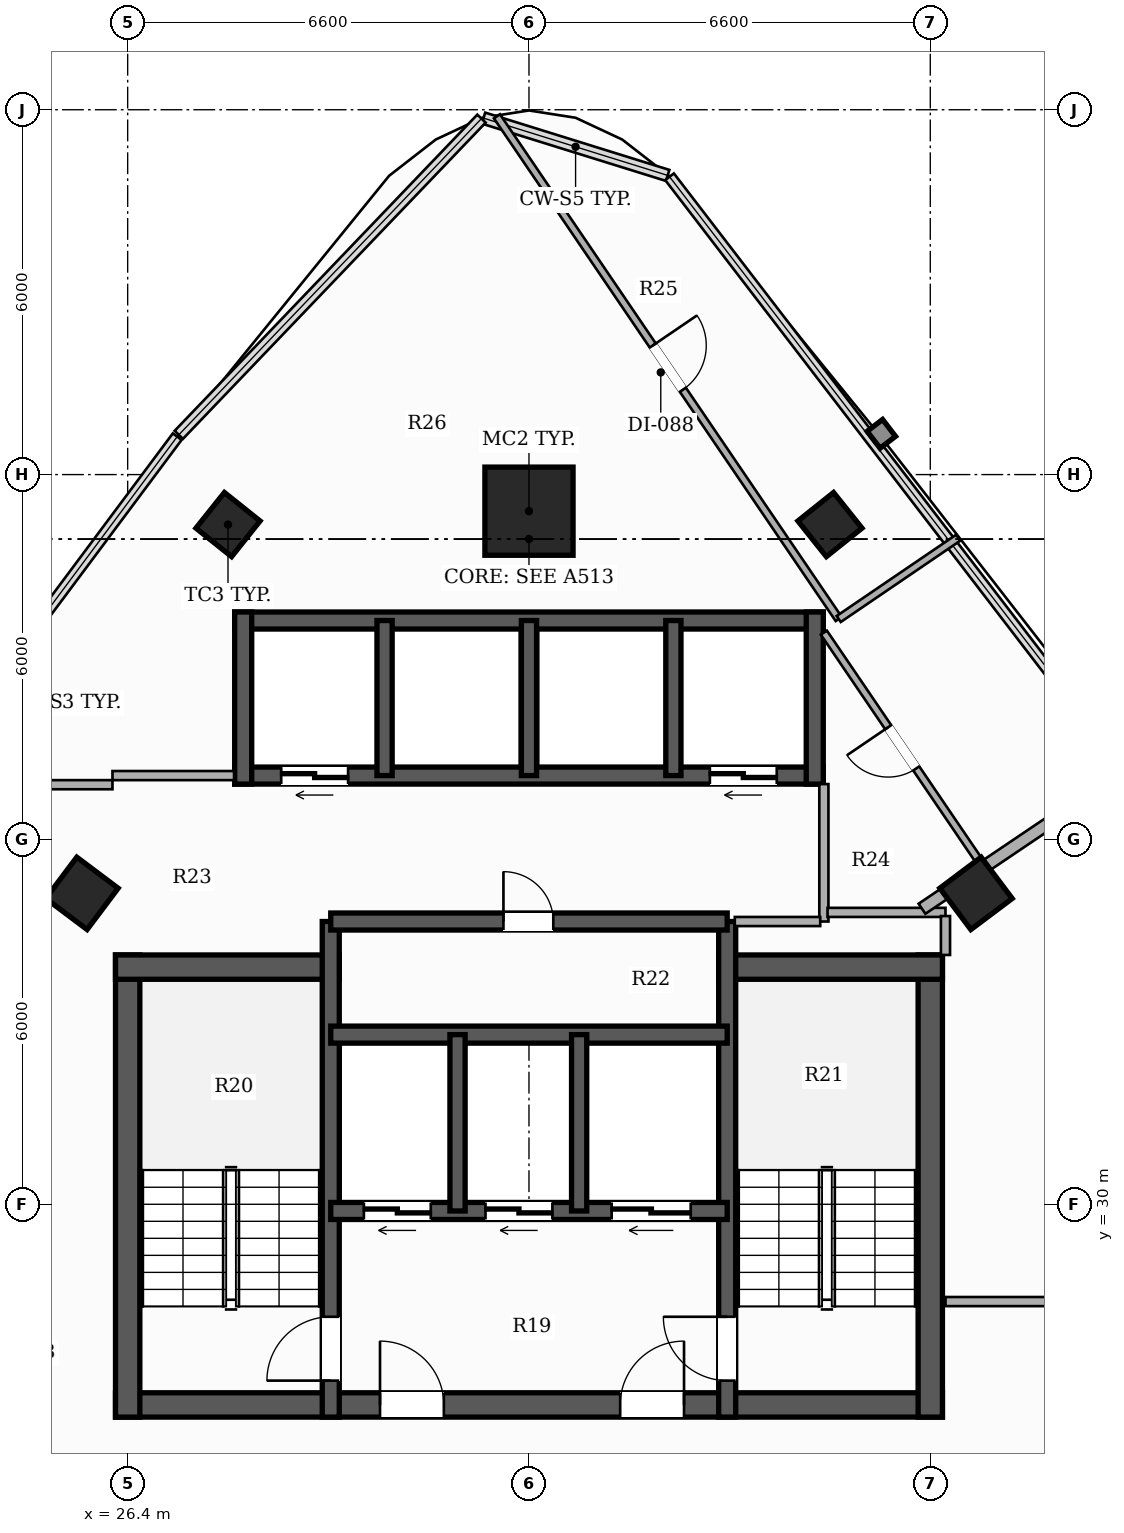
"""IFC4 building model, lengths in metres.
Left out: names, types, materials, properties, quantities, classifications, styles, units other than length and angle.
Written with IfcOpenShell. Run it as: python <this file> out.ifc"""

import sys

from ifc_helpers import new_model, si_unit, direction, frame, frame_2d, origin, origin_2d, place, context, subcontext, project, spatial, rectangle, hollow_rectangle, extrude, element, fill, save


model = new_model("IFC4")
c1 = context("Model", 3, precision=1e-05, world=origin(), true_north=direction((0.0, 1.0)))
c2 = subcontext(c1, "Body", "Model", "MODEL_VIEW")
j1 = project(units=[si_unit("LENGTHUNIT", "METRE"), si_unit("PLANEANGLEUNIT", "RADIAN")], contexts=[c1])
p1 = place(None, origin())
s1 = spatial("IfcSite", under=j1, at=p1, CompositionType="ELEMENT")
p2 = place(p1, origin())
s2 = spatial("IfcBuilding", under=s1, at=p2, CompositionType="ELEMENT")
p3 = place(p2, frame((0.0, 0.0, 163.85)))
s3 = spatial("IfcBuildingStorey", under=s2, at=p3, CompositionType="ELEMENT", Elevation=163.85)
p4 = place(p3, frame((26.2, 26.7, 0.0), z_axis=(0.0, 0.0, 1.0), x_axis=(1.0, 0.0, 0.0)))
e1 = element("IfcWall", 1, at=p4, inside=s3, PredefinedType="SHEAR", context=c2, shape_type="SweptSolid", body=[
    extrude(rectangle(XDim=13.6, YDim=0.4, at=frame_2d((6.8, 0.0))), origin(), (0.0, 0.0, 1.0), 3.3),
])
p5 = place(p4, frame((4.35, 0.0, 0.0)))
e2 = element("IfcOpeningElement", 2, at=p5, cuts=e1, PredefinedType="OPENING", context=c2, shape_type="SweptSolid", body=[
    extrude(rectangle(XDim=1.05, YDim=2.15, at=frame_2d((0.525, 1.075))), frame((0.0, 0.21, 0.0), z_axis=(0.0, -1.0, 0.0), x_axis=(1.0, 0.0, 0.0)), (0.0, 0.0, 1.0), 0.42),
])
p6 = place(p4, frame((8.3, 0.0, 0.0)))
e3 = element("IfcOpeningElement", 3, at=p6, cuts=e1, PredefinedType="OPENING", context=c2, shape_type="SweptSolid", body=[
    extrude(rectangle(XDim=1.05, YDim=2.15, at=frame_2d((0.525, 1.075))), frame((0.0, 0.21, 0.0), z_axis=(0.0, -1.0, 0.0), x_axis=(1.0, 0.0, 0.0)), (0.0, 0.0, 1.0), 0.42),
])
p7 = place(p3, frame((26.4, 26.5, 0.0), z_axis=(0.0, 0.0, 1.0), x_axis=(0.0, 1.0, 0.0)))
e4 = element("IfcWall", 4, at=p7, inside=s3, PredefinedType="SHEAR", context=c2, shape_type="SweptSolid", body=[
    extrude(rectangle(XDim=7.6, YDim=0.4, at=frame_2d((3.8, 0.0))), origin(), (0.0, 0.0, 1.0), 3.3),
])
p8 = place(p3, frame((26.2, 33.9, 0.0), z_axis=(0.0, 0.0, 1.0), x_axis=(1.0, 0.0, 0.0)))
e5 = element("IfcWall", 5, at=p8, inside=s3, PredefinedType="SHEAR", context=c2, shape_type="SweptSolid", body=[
    extrude(rectangle(XDim=3.68, YDim=0.4, at=frame_2d((1.84, 0.0))), origin(), (0.0, 0.0, 1.0), 3.3),
])
p9 = place(p3, frame((39.6, 26.5, 0.0), z_axis=(0.0, 0.0, 1.0), x_axis=(0.0, 1.0, 0.0)))
e6 = element("IfcWall", 6, at=p9, inside=s3, PredefinedType="SHEAR", context=c2, shape_type="SweptSolid", body=[
    extrude(rectangle(XDim=7.6, YDim=0.4, at=frame_2d((3.8, 0.0))), origin(), (0.0, 0.0, 1.0), 3.3),
])
p10 = place(p3, frame((36.12, 33.9, 0.0), z_axis=(0.0, 0.0, 1.0), x_axis=(1.0, 0.0, 0.0)))
e7 = element("IfcWall", 7, at=p10, inside=s3, PredefinedType="SHEAR", context=c2, shape_type="SweptSolid", body=[
    extrude(rectangle(XDim=3.68, YDim=0.4, at=frame_2d((1.84, 0.0))), origin(), (0.0, 0.0, 1.0), 3.3),
])
p11 = place(p3, frame((29.74, 26.5, 0.0), z_axis=(0.0, 0.0, 1.0), x_axis=(0.0, 1.0, 0.0)))
e8 = element("IfcWall", 8, at=p11, inside=s3, PredefinedType="SHEAR", context=c2, shape_type="SweptSolid", body=[
    extrude(rectangle(XDim=8.15, YDim=0.28, at=frame_2d((4.075, 0.0))), origin(), (0.0, 0.0, 1.0), 3.3),
])
p12 = place(p11, frame((0.6, 0.0, 0.0)))
e9 = element("IfcOpeningElement", 9, at=p12, cuts=e8, PredefinedType="OPENING", context=c2, shape_type="SweptSolid", body=[
    extrude(rectangle(XDim=1.05, YDim=2.15, at=frame_2d((0.525, 1.075))), frame((0.0, 0.15, 0.0), z_axis=(0.0, -1.0, 0.0), x_axis=(1.0, 0.0, 0.0)), (0.0, 0.0, 1.0), 0.3),
])
p13 = place(p3, frame((36.26, 26.5, 0.0), z_axis=(0.0, 0.0, 1.0), x_axis=(0.0, 1.0, 0.0)))
e10 = element("IfcWall", 10, at=p13, inside=s3, PredefinedType="SHEAR", context=c2, shape_type="SweptSolid", body=[
    extrude(rectangle(XDim=8.15, YDim=0.28, at=frame_2d((4.075, 0.0))), origin(), (0.0, 0.0, 1.0), 3.3),
])
p14 = place(p13, frame((0.6, 0.0, 0.0)))
e11 = element("IfcOpeningElement", 11, at=p14, cuts=e10, PredefinedType="OPENING", context=c2, shape_type="SweptSolid", body=[
    extrude(rectangle(XDim=1.05, YDim=2.15, at=frame_2d((0.525, 1.075))), frame((0.0, 0.15, 0.0), z_axis=(0.0, -1.0, 0.0), x_axis=(1.0, 0.0, 0.0)), (0.0, 0.0, 1.0), 0.3),
])
p15 = place(p3, frame((36.26, 29.89, 0.0), z_axis=(0.0, 0.0, 1.0), x_axis=(-1.0, 0.0, 0.0)))
e12 = element("IfcWall", 12, at=p15, inside=s3, PredefinedType="SHEAR", context=c2, shape_type="SweptSolid", body=[
    extrude(rectangle(XDim=6.52, YDim=0.28, at=frame_2d((3.26, 0.0))), origin(), (0.0, 0.0, 1.0), 3.3),
])
p16 = place(p15, frame((4.875, 0.0, 0.0)))
e13 = element("IfcOpeningElement", 13, at=p16, cuts=e12, PredefinedType="OPENING", context=c2, shape_type="SweptSolid", body=[
    extrude(rectangle(XDim=1.1, YDim=2.2, at=frame_2d((0.55, 1.1))), frame((0.0, 0.15, 0.0), z_axis=(0.0, -1.0, 0.0), x_axis=(1.0, 0.0, 0.0)), (0.0, 0.0, 1.0), 0.3),
])
p17 = place(p15, frame((2.875, 0.0, 0.0)))
e14 = element("IfcOpeningElement", 14, at=p17, cuts=e12, PredefinedType="OPENING", context=c2, shape_type="SweptSolid", body=[
    extrude(rectangle(XDim=1.1, YDim=2.2, at=frame_2d((0.55, 1.1))), frame((0.0, 0.15, 0.0), z_axis=(0.0, -1.0, 0.0), x_axis=(1.0, 0.0, 0.0)), (0.0, 0.0, 1.0), 0.3),
])
p18 = place(p15, frame((0.6, 0.0, 0.0)))
e15 = element("IfcOpeningElement", 15, at=p18, cuts=e12, PredefinedType="OPENING", context=c2, shape_type="SweptSolid", body=[
    extrude(rectangle(XDim=1.3, YDim=2.2, at=frame_2d((0.65, 1.1))), frame((0.0, 0.15, 0.0), z_axis=(0.0, -1.0, 0.0), x_axis=(1.0, 0.0, 0.0)), (0.0, 0.0, 1.0), 0.3),
])
p19 = place(p3, frame((29.74, 32.79, 0.0), z_axis=(0.0, 0.0, 1.0), x_axis=(1.0, 0.0, 0.0)))
e16 = element("IfcWall", 16, at=p19, inside=s3, PredefinedType="SHEAR", context=c2, shape_type="SweptSolid", body=[
    extrude(rectangle(XDim=6.52, YDim=0.28, at=frame_2d((3.26, 0.0))), origin(), (0.0, 0.0, 1.0), 3.3),
])
for number, where, z_axis, x_axis in (
    (17, (31.825, 29.89, 0.0), (0.0, 0.0, 1.0), (0.0, 1.0, 0.0)),
    (18, (33.825, 29.89, 0.0), (0.0, 0.0, 1.0), (0.0, 1.0, 0.0)),
):
    element("IfcWall", number, at=place(p3, frame(where, z_axis=z_axis, x_axis=x_axis)), inside=s3, PredefinedType="SHEAR", context=c2, shape_type="SweptSolid", body=[
        extrude(rectangle(XDim=2.9, YDim=0.25, at=frame_2d((1.45, 0.0))), origin(), (0.0, 0.0, 1.0), 3.3),
    ])
p20 = place(p3, frame((29.74, 34.65, 0.0), z_axis=(0.0, 0.0, 1.0), x_axis=(1.0, 0.0, 0.0)))
e19 = element("IfcWall", 19, at=p20, inside=s3, PredefinedType="SHEAR", context=c2, shape_type="SweptSolid", body=[
    extrude(rectangle(XDim=6.52, YDim=0.28, at=frame_2d((3.26, 0.0))), origin(), (0.0, 0.0, 1.0), 3.3),
])
p21 = place(p20, frame((2.84, 0.0, 0.0)))
e20 = element("IfcOpeningElement", 20, at=p21, cuts=e19, PredefinedType="OPENING", context=c2, shape_type="SweptSolid", body=[
    extrude(rectangle(XDim=0.82, YDim=2.1, at=frame_2d((0.41, 1.05))), frame((0.0, 0.15, 0.0), z_axis=(0.0, -1.0, 0.0), x_axis=(1.0, 0.0, 0.0)), (0.0, 0.0, 1.0), 0.3),
])
p22 = place(p3, frame((37.84, 37.05, 0.0), z_axis=(0.0, 0.0, 1.0), x_axis=(-1.0, 0.0, 0.0)))
e21 = element("IfcWall", 21, at=p22, inside=s3, PredefinedType="SHEAR", context=c2, shape_type="SweptSolid", body=[
    extrude(rectangle(XDim=9.68, YDim=0.28, at=frame_2d((4.84, 0.0))), origin(), (0.0, 0.0, 1.0), 3.3),
])
p23 = place(p22, frame((7.815, 0.0, 0.0)))
e22 = element("IfcOpeningElement", 22, at=p23, cuts=e21, PredefinedType="OPENING", context=c2, shape_type="SweptSolid", body=[
    extrude(rectangle(XDim=1.1, YDim=2.2, at=frame_2d((0.55, 1.1))), frame((0.0, 0.15, 0.0), z_axis=(0.0, -1.0, 0.0), x_axis=(1.0, 0.0, 0.0)), (0.0, 0.0, 1.0), 0.3),
])
p24 = place(p22, frame((0.765, 0.0, 0.0)))
e23 = element("IfcOpeningElement", 23, at=p24, cuts=e21, PredefinedType="OPENING", context=c2, shape_type="SweptSolid", body=[
    extrude(rectangle(XDim=1.1, YDim=2.2, at=frame_2d((0.55, 1.1))), frame((0.0, 0.15, 0.0), z_axis=(0.0, -1.0, 0.0), x_axis=(1.0, 0.0, 0.0)), (0.0, 0.0, 1.0), 0.3),
])
p25 = place(p3, frame((28.16, 39.6, 0.0), z_axis=(0.0, 0.0, 1.0), x_axis=(1.0, 0.0, 0.0)))
e24 = element("IfcWall", 24, at=p25, inside=s3, PredefinedType="SHEAR", context=c2, shape_type="SweptSolid", body=[
    extrude(rectangle(XDim=9.68, YDim=0.28, at=frame_2d((4.84, 0.0))), origin(), (0.0, 0.0, 1.0), 3.3),
])
for number, where, z_axis, x_axis in (
    (25, (28.3, 36.91, 0.0), (0.0, 0.0, 1.0), (0.0, 1.0, 0.0)),
    (26, (37.7, 36.91, 0.0), (0.0, 0.0, 1.0), (0.0, 1.0, 0.0)),
):
    element("IfcWall", number, at=place(p3, frame(where, z_axis=z_axis, x_axis=x_axis)), inside=s3, PredefinedType="SHEAR", context=c2, shape_type="SweptSolid", body=[
        extrude(rectangle(XDim=2.83, YDim=0.28, at=frame_2d((1.415, 0.0))), origin(), (0.0, 0.0, 1.0), 3.3),
    ])
for number, where, z_axis, x_axis in (
    (27, (30.625, 37.05, 0.0), (0.0, 0.0, 1.0), (0.0, 1.0, 0.0)),
    (28, (33.0, 37.05, 0.0), (0.0, 0.0, 1.0), (0.0, 1.0, 0.0)),
    (29, (35.375, 37.05, 0.0), (0.0, 0.0, 1.0), (0.0, 1.0, 0.0)),
):
    element("IfcWall", number, at=place(p3, frame(where, z_axis=z_axis, x_axis=x_axis)), inside=s3, PredefinedType="SHEAR", context=c2, shape_type="SweptSolid", body=[
        extrude(rectangle(XDim=2.55, YDim=0.25, at=frame_2d((1.275, 0.0))), origin(), (0.0, 0.0, 1.0), 3.3),
    ])
p26 = place(p3, frame((33.0, 41.398, 0.0), z_axis=(0.0, 0.0, 1.0), x_axis=(1.0, 0.0, 0.0)))
e30 = element("IfcColumn", 30, at=p26, inside=s3, PredefinedType="COLUMN", context=c2, shape_type="SweptSolid", body=[
    extrude(hollow_rectangle(XDim=1.45, YDim=1.45, WallThickness=0.045, at=origin_2d()), origin(), (0.0, 0.0, 1.0), 3.3),
])
for number, where, z_axis, x_axis in (
    (31, (25.648, 35.113, 0.0), (0.0, 0.0, 1.0), (0.6, 0.8, 0.0)),
    (32, (40.352, 35.113, 0.0), (0.0, 0.0, 1.0), (-0.6, 0.8, 0.0)),
):
    element("IfcColumn", number, at=place(p3, frame(where, z_axis=z_axis, x_axis=x_axis)), inside=s3, PredefinedType="COLUMN", context=c2, shape_type="SweptSolid", body=[
        extrude(hollow_rectangle(XDim=0.85, YDim=0.85, WallThickness=0.028, at=origin_2d()), origin(), (0.0, 0.0, 1.0), 3.3),
    ])
for number, where, z_axis, x_axis in (
    (33, (28.05, 41.178, 0.0), (0.0, 0.0, 1.0), (0.624, 0.782, 0.0)),
    (34, (37.95, 41.178, 0.0), (0.0, 0.0, 1.0), (-0.624, 0.782, 0.0)),
):
    element("IfcColumn", number, at=place(p3, frame(where, z_axis=z_axis, x_axis=x_axis)), inside=s3, PredefinedType="COLUMN", context=c2, shape_type="SweptSolid", body=[
        extrude(hollow_rectangle(XDim=0.75, YDim=0.75, WallThickness=0.025, at=origin_2d()), origin(), (0.0, 0.0, 1.0), 3.3),
    ])
p27 = place(p3, frame((37.85, 34.65, 0.0), z_axis=(0.0, 0.0, 1.0), x_axis=(0.0, 1.0, 0.0)))
e35 = element("IfcWall", 35, at=p27, inside=s3, PredefinedType="PARTITIONING", context=c2, shape_type="SweptSolid", body=[
    extrude(rectangle(XDim=2.26, YDim=0.15, at=frame_2d((1.13, 0.0))), origin(), (0.0, 0.0, 1.0), 3.06),
])
p28 = place(p3, frame((36.385, 34.65, 0.0), z_axis=(0.0, 0.0, 1.0), x_axis=(1.0, 0.0, 0.0)))
e36 = element("IfcWall", 36, at=p28, inside=s3, PredefinedType="PARTITIONING", context=c2, shape_type="SweptSolid", body=[
    extrude(rectangle(XDim=1.405, YDim=0.15, at=frame_2d((0.703, 0.0))), origin(), (0.0, 0.0, 1.0), 2.425),
])
p29 = place(p3, frame((23.56, 36.9, 0.0), z_axis=(0.0, 0.0, 1.0), x_axis=(1.0, 0.0, 0.0)))
e37 = element("IfcWall", 37, at=p29, inside=s3, PredefinedType="PARTITIONING", context=c2, shape_type="SweptSolid", body=[
    extrude(rectangle(XDim=2.59, YDim=0.15, at=frame_2d((1.295, 0.0))), origin(), (0.0, 0.0, 1.0), 2.413),
])
p30 = place(p3, frame((39.85, 28.4, 0.0), z_axis=(0.0, 0.0, 1.0), x_axis=(1.0, 0.0, 0.0)))
e38 = element("IfcWall", 38, at=p30, inside=s3, PredefinedType="PARTITIONING", context=c2, shape_type="SweptSolid", body=[
    extrude(rectangle(XDim=2.5, YDim=0.15, at=frame_2d((1.25, 0.0))), origin(), (0.0, 0.0, 1.0), 2.721),
])
p31 = place(p3, frame((26.15, 37.05, 0.0), z_axis=(0.0, 0.0, 1.0), x_axis=(1.0, 0.0, 0.0)))
e39 = element("IfcWall", 39, at=p31, inside=s3, PredefinedType="PARTITIONING", context=c2, shape_type="SweptSolid", body=[
    extrude(rectangle(XDim=2.0, YDim=0.15, at=frame_2d((1.0, 0.0))), origin(), (0.0, 0.0, 1.0), 2.413),
])
p32 = place(p3, frame((37.91, 34.8, 0.0), z_axis=(0.0, 0.0, 1.0), x_axis=(1.0, 0.0, 0.0)))
e40 = element("IfcWall", 40, at=p32, inside=s3, PredefinedType="PARTITIONING", context=c2, shape_type="SweptSolid", body=[
    extrude(rectangle(XDim=1.94, YDim=0.15, at=frame_2d((0.97, 0.0))), origin(), (0.0, 0.0, 1.0), 2.721),
])
p33 = place(p3, frame((39.85, 34.74, 0.0), z_axis=(0.0, 0.0, 1.0), x_axis=(0.0, -1.0, 0.0)))
e41 = element("IfcWall", 41, at=p33, inside=s3, PredefinedType="PARTITIONING", context=c2, shape_type="SweptSolid", body=[
    extrude(rectangle(XDim=0.64, YDim=0.15, at=frame_2d((0.32, 0.0))), origin(), (0.0, 0.0, 1.0), 2.721),
])
p34 = place(p3, frame((39.464, 34.86, 0.0), z_axis=(0.0, 0.0, 1.0), x_axis=(0.828976210701, 0.559283865395, 0.0)))
e42 = element("IfcWall", 42, at=p34, inside=s3, PredefinedType="PARTITIONING", context=c2, shape_type="SweptSolid", body=[
    extrude(rectangle(XDim=4.171, YDim=0.2, at=frame_2d((2.086, 0.0))), origin(), (0.0, 0.0, 1.0), 2.413),
])
p35 = place(p3, frame((40.427, 35.612, 0.0), z_axis=(0.0, 0.0, 1.0), x_axis=(-0.562385802303, 0.826874965982, 0.0)))
e43 = element("IfcWall", 43, at=p35, inside=s3, PredefinedType="PARTITIONING", context=c2, shape_type="SweptSolid", body=[
    extrude(rectangle(XDim=4.582, YDim=0.12, at=frame_2d((2.291, 0.0))), origin(), (0.0, 0.0, 1.0), 2.413),
])
p36 = place(p35, frame((1.881, 0.0, 0.0)))
e44 = element("IfcOpeningElement", 44, at=p36, cuts=e43, PredefinedType="OPENING", context=c2, shape_type="SweptSolid", body=[
    extrude(rectangle(XDim=0.82, YDim=2.1, at=frame_2d((0.41, 1.05))), frame((0.0, 0.07, 0.0), z_axis=(0.0, -1.0, 0.0), x_axis=(1.0, 0.0, 0.0)), (0.0, 0.0, 1.0), 0.14),
])
p37 = place(p3, frame((32.473, 47.892, 0.0), z_axis=(0.0, 0.0, 1.0), x_axis=(0.562273950157, -0.826951029369, 0.0)))
e45 = element("IfcWall", 45, at=p37, inside=s3, PredefinedType="PARTITIONING", context=c2, shape_type="SweptSolid", body=[
    extrude(rectangle(XDim=9.997, YDim=0.12, at=frame_2d((4.999, 0.0))), origin(), (0.0, 0.0, 1.0), 2.413),
])
p38 = place(p37, frame((4.558, 0.0, 0.0)))
e46 = element("IfcOpeningElement", 46, at=p38, cuts=e45, PredefinedType="OPENING", context=c2, shape_type="SweptSolid", body=[
    extrude(rectangle(XDim=0.88, YDim=2.1, at=frame_2d((0.44, 1.05))), frame((0.0, 0.07, 0.0), z_axis=(0.0, -1.0, 0.0), x_axis=(1.0, 0.0, 0.0)), (0.0, 0.0, 1.0), 0.14),
])
p39 = place(p3, frame((38.094, 39.625, 0.0), z_axis=(0.0, 0.0, 1.0), x_axis=(0.826798473187, 0.562498253096, 0.0)))
e47 = element("IfcWall", 47, at=p39, inside=s3, PredefinedType="PARTITIONING", context=c2, shape_type="SweptSolid", body=[
    extrude(rectangle(XDim=2.377, YDim=0.12, at=frame_2d((1.188, 0.0))), origin(), (0.0, 0.0, 1.0), 2.413),
])
p40 = place(p12, origin())
e48 = element("IfcDoor", 48, at=p40, inside=s3, OperationType="SINGLE_SWING_LEFT", PredefinedType="DOOR", context=c2, shape_type="SweptSolid", body=[
    extrude(rectangle(XDim=1.05, YDim=2.15, at=frame_2d((0.525, 1.075))), frame((0.0, 0.025, 0.0), z_axis=(0.0, -1.0, 0.0), x_axis=(1.0, 0.0, 0.0)), (0.0, 0.0, 1.0), 0.05),
])
fill(e9, e48)
p41 = place(p14, origin())
e49 = element("IfcDoor", 49, at=p41, inside=s3, OperationType="SINGLE_SWING_RIGHT", PredefinedType="DOOR", context=c2, shape_type="SweptSolid", body=[
    extrude(rectangle(XDim=1.05, YDim=2.15, at=frame_2d((0.525, 1.075))), frame((0.0, 0.025, 0.0), z_axis=(0.0, -1.0, 0.0), x_axis=(1.0, 0.0, 0.0)), (0.0, 0.0, 1.0), 0.05),
])
fill(e11, e49)
p42 = place(p5, origin())
e50 = element("IfcDoor", 50, at=p42, inside=s3, OperationType="SINGLE_SWING_LEFT", PredefinedType="DOOR", context=c2, shape_type="SweptSolid", body=[
    extrude(rectangle(XDim=1.05, YDim=2.15, at=frame_2d((0.525, 1.075))), frame((0.0, 0.025, 0.0), z_axis=(0.0, -1.0, 0.0), x_axis=(1.0, 0.0, 0.0)), (0.0, 0.0, 1.0), 0.05),
])
fill(e2, e50)
p43 = place(p6, origin())
e51 = element("IfcDoor", 51, at=p43, inside=s3, OperationType="SINGLE_SWING_RIGHT", PredefinedType="DOOR", context=c2, shape_type="SweptSolid", body=[
    extrude(rectangle(XDim=1.05, YDim=2.15, at=frame_2d((0.525, 1.075))), frame((0.0, 0.025, 0.0), z_axis=(0.0, -1.0, 0.0), x_axis=(1.0, 0.0, 0.0)), (0.0, 0.0, 1.0), 0.05),
])
fill(e3, e51)
p44 = place(p16, origin())
e52 = element("IfcDoor", 52, at=p44, inside=s3, OperationType="DOUBLE_DOOR_SLIDING", PredefinedType="DOOR", context=c2, shape_type="SweptSolid", body=[
    extrude(rectangle(XDim=1.1, YDim=2.2, at=frame_2d((0.55, 1.1))), frame((0.0, 0.025, 0.0), z_axis=(0.0, -1.0, 0.0), x_axis=(1.0, 0.0, 0.0)), (0.0, 0.0, 1.0), 0.05),
])
fill(e13, e52)
p45 = place(p17, origin())
e53 = element("IfcDoor", 53, at=p45, inside=s3, OperationType="DOUBLE_DOOR_SLIDING", PredefinedType="DOOR", context=c2, shape_type="SweptSolid", body=[
    extrude(rectangle(XDim=1.1, YDim=2.2, at=frame_2d((0.55, 1.1))), frame((0.0, 0.025, 0.0), z_axis=(0.0, -1.0, 0.0), x_axis=(1.0, 0.0, 0.0)), (0.0, 0.0, 1.0), 0.05),
])
fill(e14, e53)
p46 = place(p18, origin())
e54 = element("IfcDoor", 54, at=p46, inside=s3, OperationType="DOUBLE_DOOR_SLIDING", PredefinedType="DOOR", context=c2, shape_type="SweptSolid", body=[
    extrude(rectangle(XDim=1.3, YDim=2.2, at=frame_2d((0.65, 1.1))), frame((0.0, 0.025, 0.0), z_axis=(0.0, -1.0, 0.0), x_axis=(1.0, 0.0, 0.0)), (0.0, 0.0, 1.0), 0.05),
])
fill(e15, e54)
p47 = place(p23, origin())
e55 = element("IfcDoor", 55, at=p47, inside=s3, OperationType="DOUBLE_DOOR_SLIDING", PredefinedType="DOOR", context=c2, shape_type="SweptSolid", body=[
    extrude(rectangle(XDim=1.1, YDim=2.2, at=frame_2d((0.55, 1.1))), frame((0.0, 0.025, 0.0), z_axis=(0.0, -1.0, 0.0), x_axis=(1.0, 0.0, 0.0)), (0.0, 0.0, 1.0), 0.05),
])
fill(e22, e55)
p48 = place(p24, origin())
e56 = element("IfcDoor", 56, at=p48, inside=s3, OperationType="DOUBLE_DOOR_SLIDING", PredefinedType="DOOR", context=c2, shape_type="SweptSolid", body=[
    extrude(rectangle(XDim=1.1, YDim=2.2, at=frame_2d((0.55, 1.1))), frame((0.0, 0.025, 0.0), z_axis=(0.0, -1.0, 0.0), x_axis=(1.0, 0.0, 0.0)), (0.0, 0.0, 1.0), 0.05),
])
fill(e23, e56)
p49 = place(p21, origin())
e57 = element("IfcDoor", 57, at=p49, inside=s3, OperationType="SINGLE_SWING_LEFT", PredefinedType="DOOR", context=c2, shape_type="SweptSolid", body=[
    extrude(rectangle(XDim=0.82, YDim=2.1, at=frame_2d((0.41, 1.05))), frame((0.0, 0.025, 0.0), z_axis=(0.0, -1.0, 0.0), x_axis=(1.0, 0.0, 0.0)), (0.0, 0.0, 1.0), 0.05),
])
fill(e20, e57)
p50 = place(p36, origin())
e58 = element("IfcDoor", 58, at=p50, inside=s3, OperationType="SINGLE_SWING_RIGHT", PredefinedType="DOOR", context=c2, shape_type="SweptSolid", body=[
    extrude(rectangle(XDim=0.82, YDim=2.1, at=frame_2d((0.41, 1.05))), frame((0.0, 0.025, 0.0), z_axis=(0.0, -1.0, 0.0), x_axis=(1.0, 0.0, 0.0)), (0.0, 0.0, 1.0), 0.05),
])
fill(e44, e58)
p51 = place(p38, origin())
e59 = element("IfcDoor", 59, at=p51, inside=s3, OperationType="SINGLE_SWING_LEFT", PredefinedType="DOOR", context=c2, shape_type="SweptSolid", body=[
    extrude(rectangle(XDim=0.88, YDim=2.1, at=frame_2d((0.44, 1.05))), frame((0.0, 0.025, 0.0), z_axis=(0.0, -1.0, 0.0), x_axis=(1.0, 0.0, 0.0)), (0.0, 0.0, 1.0), 0.05),
])
fill(e46, e59)
save(model, sys.argv[1])
